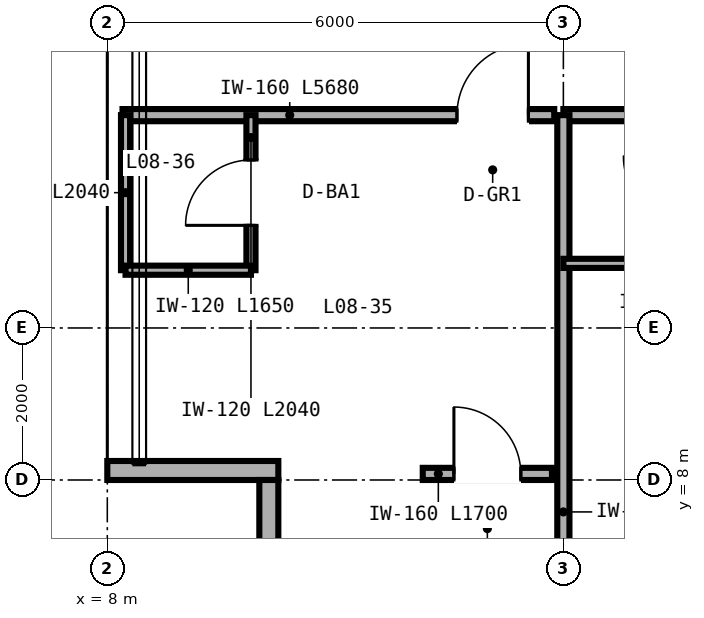
"""IFC4 building model, lengths in metres.
Left out: names, types, materials, properties, quantities, classifications, styles, units other than length and angle.
Written with IfcOpenShell. Run it as: python <this file> out.ifc"""

import sys

from ifc_helpers import new_model, si_unit, direction, frame, frame_2d, origin, place, context, subcontext, project, spatial, rectangle, extrude, source, transform, mapped, element, fill, save


model = new_model("IFC4")
c1 = context("Model", 3, precision=1e-05, world=origin(), true_north=direction((0.0, 1.0)))
c2 = subcontext(c1, "Body", "Model", "MODEL_VIEW")
j1 = project(units=[si_unit("LENGTHUNIT", "METRE"), si_unit("PLANEANGLEUNIT", "RADIAN")], contexts=[c1])
p1 = place(None, origin())
s1 = spatial("IfcSite", under=j1, at=p1, CompositionType="ELEMENT")
p2 = place(p1, origin())
s2 = spatial("IfcBuilding", under=s1, at=p2, CompositionType="ELEMENT")
p3 = place(p2, frame((0.0, 0.0, 38.4)))
s3 = spatial("IfcBuildingStorey", under=s2, at=p3, CompositionType="ELEMENT", Elevation=38.4)
p4 = place(p3, frame((8.0, 8.125, 0.0), z_axis=(0.0, 0.0, 1.0), x_axis=(1.0, 0.0, 0.0)))
e1 = element("IfcWall", 1, at=p4, inside=s3, PredefinedType="SOLIDWALL", context=c2, shape_type="SweptSolid", body=[
    extrude(rectangle(XDim=2.25, YDim=0.25, at=frame_2d((1.125, 0.0))), origin(), (0.0, 0.0, 1.0), 3.35),
])
p5 = place(p3, frame((10.125, 8.0, 0.0), z_axis=(0.0, 0.0, 1.0), x_axis=(0.0, -1.0, 0.0)))
e2 = element("IfcWall", 2, at=p5, inside=s3, PredefinedType="SOLIDWALL", context=c2, shape_type="SweptSolid", body=[
    extrude(rectangle(XDim=2.0, YDim=0.25, at=frame_2d((1.0, 0.0))), origin(), (0.0, 0.0, 1.0), 3.35),
])
p6 = place(p3, frame((8.2, 12.8, 0.0), z_axis=(0.0, 0.0, 1.0), x_axis=(1.0, 0.0, 0.0)))
e3 = element("IfcWall", 3, at=p6, inside=s3, PredefinedType="PARTITIONING", context=c2, shape_type="SweptSolid", body=[
    extrude(rectangle(XDim=5.68, YDim=0.16, at=frame_2d((2.84, 0.0))), origin(), (0.0, 0.0, 1.0), 3.35),
])
p7 = place(p6, frame((4.4, 0.0, 0.0)))
e4 = element("IfcOpeningElement", 4, at=p7, cuts=e3, PredefinedType="OPENING", context=c2, shape_type="SweptSolid", body=[
    extrude(rectangle(XDim=0.94, YDim=2.15, at=frame_2d((0.47, 1.075))), frame((0.0, 0.09, 0.0), z_axis=(0.0, -1.0, 0.0), x_axis=(1.0, 0.0, 0.0)), (0.0, 0.0, 1.0), 0.18),
])
p8 = place(p3, frame((9.89, 10.76, 0.0), z_axis=(0.0, 0.0, 1.0), x_axis=(0.0, 1.0, 0.0)))
e5 = element("IfcWall", 5, at=p8, inside=s3, PredefinedType="PARTITIONING", context=c2, shape_type="SweptSolid", body=[
    extrude(rectangle(XDim=2.04, YDim=0.12, at=frame_2d((1.02, 0.0))), origin(), (0.0, 0.0, 1.0), 3.35),
])
p9 = place(p8, frame((0.59, 0.0, 0.0)))
e6 = element("IfcOpeningElement", 6, at=p9, cuts=e5, PredefinedType="OPENING", context=c2, shape_type="SweptSolid", body=[
    extrude(rectangle(XDim=0.86, YDim=2.1, at=frame_2d((0.43, 1.05))), frame((0.0, 0.07, 0.0), z_axis=(0.0, -1.0, 0.0), x_axis=(1.0, 0.0, 0.0)), (0.0, 0.0, 1.0), 0.14),
])
p10 = place(p3, frame((8.24, 10.76, 0.0), z_axis=(0.0, 0.0, 1.0), x_axis=(0.0, 1.0, 0.0)))
e7 = element("IfcWall", 7, at=p10, inside=s3, PredefinedType="PARTITIONING", context=c2, shape_type="SweptSolid", body=[
    extrude(rectangle(XDim=2.04, YDim=0.12, at=frame_2d((1.02, 0.0))), origin(), (0.0, 0.0, 1.0), 3.35),
])
p11 = place(p3, frame((8.24, 10.76, 0.0), z_axis=(0.0, 0.0, 1.0), x_axis=(1.0, 0.0, 0.0)))
e8 = element("IfcWall", 8, at=p11, inside=s3, PredefinedType="PARTITIONING", context=c2, shape_type="SweptSolid", body=[
    extrude(rectangle(XDim=1.65, YDim=0.12, at=frame_2d((0.825, 0.0))), origin(), (0.0, 0.0, 1.0), 3.35),
])
p12 = place(p3, frame((12.15, 8.08, 0.0), z_axis=(0.0, 0.0, 1.0), x_axis=(1.0, 0.0, 0.0)))
e9 = element("IfcWall", 9, at=p12, inside=s3, PredefinedType="PARTITIONING", context=c2, shape_type="SweptSolid", body=[
    extrude(rectangle(XDim=1.7, YDim=0.16, at=frame_2d((0.85, 0.0))), origin(), (0.0, 0.0, 1.0), 3.35),
])
p13 = place(p12, frame((0.41, 0.0, 0.0)))
e10 = element("IfcOpeningElement", 10, at=p13, cuts=e9, PredefinedType="OPENING", context=c2, shape_type="SweptSolid", body=[
    extrude(rectangle(XDim=0.88, YDim=2.15, at=frame_2d((0.44, 1.075))), frame((0.0, 0.09, 0.0), z_axis=(0.0, -1.0, 0.0), x_axis=(1.0, 0.0, 0.0)), (0.0, 0.0, 1.0), 0.18),
])
p14 = place(p3, frame((14.0, 12.8, 0.0), z_axis=(0.0, 0.0, 1.0), x_axis=(1.0, 0.0, 0.0)))
e11 = element("IfcWall", 11, at=p14, inside=s3, PredefinedType="PARTITIONING", context=c2, shape_type="SweptSolid", body=[
    extrude(rectangle(XDim=36.0, YDim=0.16, at=frame_2d((18.0, 0.0))), origin(), (0.0, 0.0, 1.0), 2.571),
])
p15 = place(p14, frame((2.94, 0.0, 0.0)))
e12 = element("IfcOpeningElement", 12, at=p15, cuts=e11, PredefinedType="OPENING", context=c2, shape_type="SweptSolid", body=[
    extrude(rectangle(XDim=0.94, YDim=2.15, at=frame_2d((0.47, 1.075))), frame((0.0, 0.09, 0.0), z_axis=(0.0, -1.0, 0.0), x_axis=(1.0, 0.0, 0.0)), (0.0, 0.0, 1.0), 0.18),
])
p16 = place(p14, frame((7.14, 0.0, 0.0)))
e13 = element("IfcOpeningElement", 13, at=p16, cuts=e11, PredefinedType="OPENING", context=c2, shape_type="SweptSolid", body=[
    extrude(rectangle(XDim=0.94, YDim=2.15, at=frame_2d((0.47, 1.075))), frame((0.0, 0.09, 0.0), z_axis=(0.0, -1.0, 0.0), x_axis=(1.0, 0.0, 0.0)), (0.0, 0.0, 1.0), 0.18),
])
p17 = place(p14, frame((11.54, 0.0, 0.0)))
e14 = element("IfcOpeningElement", 14, at=p17, cuts=e11, PredefinedType="OPENING", context=c2, shape_type="SweptSolid", body=[
    extrude(rectangle(XDim=0.94, YDim=2.15, at=frame_2d((0.47, 1.075))), frame((0.0, 0.09, 0.0), z_axis=(0.0, -1.0, 0.0), x_axis=(1.0, 0.0, 0.0)), (0.0, 0.0, 1.0), 0.18),
])
p18 = place(p14, frame((15.94, 0.0, 0.0)))
e15 = element("IfcOpeningElement", 15, at=p18, cuts=e11, PredefinedType="OPENING", context=c2, shape_type="SweptSolid", body=[
    extrude(rectangle(XDim=0.94, YDim=2.15, at=frame_2d((0.47, 1.075))), frame((0.0, 0.09, 0.0), z_axis=(0.0, -1.0, 0.0), x_axis=(1.0, 0.0, 0.0)), (0.0, 0.0, 1.0), 0.18),
])
p19 = place(p14, frame((20.54, 0.0, 0.0)))
e16 = element("IfcOpeningElement", 16, at=p19, cuts=e11, PredefinedType="OPENING", context=c2, shape_type="SweptSolid", body=[
    extrude(rectangle(XDim=0.94, YDim=2.15, at=frame_2d((0.47, 1.075))), frame((0.0, 0.09, 0.0), z_axis=(0.0, -1.0, 0.0), x_axis=(1.0, 0.0, 0.0)), (0.0, 0.0, 1.0), 0.18),
])
p20 = place(p14, frame((24.84, 0.0, 0.0)))
e17 = element("IfcOpeningElement", 17, at=p20, cuts=e11, PredefinedType="OPENING", context=c2, shape_type="SweptSolid", body=[
    extrude(rectangle(XDim=0.94, YDim=2.15, at=frame_2d((0.47, 1.075))), frame((0.0, 0.09, 0.0), z_axis=(0.0, -1.0, 0.0), x_axis=(1.0, 0.0, 0.0)), (0.0, 0.0, 1.0), 0.18),
])
p21 = place(p14, frame((29.94, 0.0, 0.0)))
e18 = element("IfcOpeningElement", 18, at=p21, cuts=e11, PredefinedType="OPENING", context=c2, shape_type="SweptSolid", body=[
    extrude(rectangle(XDim=0.94, YDim=2.15, at=frame_2d((0.47, 1.075))), frame((0.0, 0.09, 0.0), z_axis=(0.0, -1.0, 0.0), x_axis=(1.0, 0.0, 0.0)), (0.0, 0.0, 1.0), 0.18),
])
p22 = place(p14, frame((34.74, 0.0, 0.0)))
e19 = element("IfcOpeningElement", 19, at=p22, cuts=e11, PredefinedType="OPENING", context=c2, shape_type="SweptSolid", body=[
    extrude(rectangle(XDim=0.94, YDim=2.15, at=frame_2d((0.47, 1.075))), frame((0.0, 0.09, 0.0), z_axis=(0.0, -1.0, 0.0), x_axis=(1.0, 0.0, 0.0)), (0.0, 0.0, 1.0), 0.18),
])
p23 = place(p3, frame((14.0, 2.36, 0.0), z_axis=(0.0, 0.0, 1.0), x_axis=(0.0, 1.0, 0.0)))
e20 = element("IfcWall", 20, at=p23, inside=s3, PredefinedType="PARTITIONING", context=c2, shape_type="SweptSolid", body=[
    extrude(rectangle(XDim=10.44, YDim=0.16, at=frame_2d((5.22, 0.0))), origin(), (0.0, 0.0, 1.0), 2.657),
])
p24 = place(p3, frame((14.0, 10.85, 0.0), z_axis=(0.0, 0.0, 1.0), x_axis=(1.0, 0.0, 0.0)))
e21 = element("IfcWall", 21, at=p24, inside=s3, PredefinedType="PARTITIONING", context=c2, shape_type="SweptSolid", body=[
    extrude(rectangle(XDim=1.65, YDim=0.12, at=frame_2d((0.825, 0.0))), origin(), (0.0, 0.0, 1.0), 3.35),
])
m1 = source(origin(), c2, "Body", "SweptSolid", [
    extrude(rectangle(XDim=0.86, YDim=2.1, at=frame_2d((0.43, 1.05))), frame((0.0, 0.025, 0.0), z_axis=(0.0, -1.0, 0.0), x_axis=(1.0, 0.0, 0.0)), (0.0, 0.0, 1.0), 0.05),
])
p25 = place(p9, origin())
e22 = element("IfcDoor", 22, at=p25, inside=s3, OperationType="SINGLE_SWING_LEFT", PredefinedType="DOOR", context=c2, shape_type="MappedRepresentation", body=[
    mapped(m1, transform((0.0, 0.0, 0.0), scale=1.0)),
])
fill(e6, e22)
m2 = source(origin(), c2, "Body", "SweptSolid", [
    extrude(rectangle(XDim=0.94, YDim=2.15, at=frame_2d((0.47, 1.075))), frame((0.0, 0.025, 0.0), z_axis=(0.0, -1.0, 0.0), x_axis=(1.0, 0.0, 0.0)), (0.0, 0.0, 1.0), 0.05),
])
p26 = place(p7, origin())
e23 = element("IfcDoor", 23, at=p26, inside=s3, OperationType="SINGLE_SWING_RIGHT", PredefinedType="DOOR", context=c2, shape_type="MappedRepresentation", body=[
    mapped(m2, transform((0.0, 0.0, 0.0), scale=1.0)),
])
fill(e4, e23)
m3 = source(origin(), c2, "Body", "SweptSolid", [
    extrude(rectangle(XDim=0.88, YDim=2.15, at=frame_2d((0.44, 1.075))), frame((0.0, 0.025, 0.0), z_axis=(0.0, -1.0, 0.0), x_axis=(1.0, 0.0, 0.0)), (0.0, 0.0, 1.0), 0.05),
])
p27 = place(p13, origin())
e24 = element("IfcDoor", 24, at=p27, inside=s3, OperationType="SINGLE_SWING_LEFT", PredefinedType="DOOR", context=c2, shape_type="MappedRepresentation", body=[
    mapped(m3, transform((0.0, 0.0, 0.0), scale=1.0)),
])
fill(e10, e24)
save(model, sys.argv[1])
